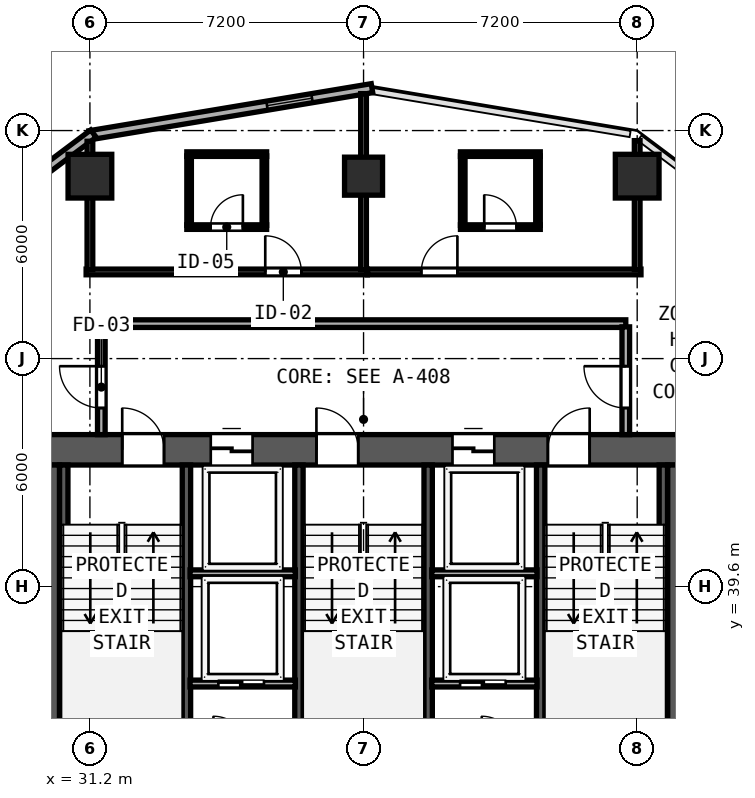
"""IFC4 building model, lengths in metres.
Left out: names, types, materials, properties, quantities, classifications, styles, units other than length and angle.
Written with IfcOpenShell. Run it as: python <this file> out.ifc"""

import sys

from ifc_helpers import new_model, si_unit, direction, frame, frame_2d, origin, origin_2d, place, context, subcontext, project, spatial, rectangle, hollow_rectangle, extrude, element, fill, save


model = new_model("IFC4")
c1 = context("Model", 3, precision=1e-05, world=origin(), true_north=direction((0.0, 1.0)))
c2 = subcontext(c1, "Body", "Model", "MODEL_VIEW")
j1 = project(units=[si_unit("LENGTHUNIT", "METRE"), si_unit("PLANEANGLEUNIT", "RADIAN")], contexts=[c1])
p1 = place(None, origin())
s1 = spatial("IfcSite", under=j1, at=p1, CompositionType="ELEMENT")
p2 = place(p1, origin())
s2 = spatial("IfcBuilding", under=s1, at=p2, CompositionType="ELEMENT")
p3 = place(p2, frame((0.0, 0.0, 47.6)))
s3 = spatial("IfcBuildingStorey", under=s2, at=p3, CompositionType="ELEMENT", Elevation=47.6)
p4 = place(p3, frame((29.6, 43.2, 0.0), z_axis=(0.0, 0.0, 1.0), x_axis=(1.0, 0.0, 0.0)))
e1 = element("IfcWall", 1, at=p4, inside=s3, PredefinedType="SHEAR", context=c2, shape_type="SweptSolid", body=[
    extrude(rectangle(XDim=17.6, YDim=0.8, at=frame_2d((8.8, 0.0))), origin(), (0.0, 0.0, 1.0), 3.6),
])
p5 = place(p4, frame((2.45, 0.0, 0.0)))
e2 = element("IfcOpeningElement", 2, at=p5, cuts=e1, PredefinedType="OPENING", context=c2, shape_type="SweptSolid", body=[
    extrude(rectangle(XDim=1.1, YDim=2.15, at=frame_2d((0.55, 1.075))), frame((0.0, 0.41, 0.0), z_axis=(0.0, -1.0, 0.0), x_axis=(1.0, 0.0, 0.0)), (0.0, 0.0, 1.0), 0.82),
])
p6 = place(p4, frame((7.56, 0.0, 0.0)))
e3 = element("IfcOpeningElement", 3, at=p6, cuts=e1, PredefinedType="OPENING", context=c2, shape_type="SweptSolid", body=[
    extrude(rectangle(XDim=1.1, YDim=2.15, at=frame_2d((0.55, 1.075))), frame((0.0, 0.41, 0.0), z_axis=(0.0, -1.0, 0.0), x_axis=(1.0, 0.0, 0.0)), (0.0, 0.0, 1.0), 0.82),
])
p7 = place(p4, frame((13.65, 0.0, 0.0)))
e4 = element("IfcOpeningElement", 4, at=p7, cuts=e1, PredefinedType="OPENING", context=c2, shape_type="SweptSolid", body=[
    extrude(rectangle(XDim=1.1, YDim=2.15, at=frame_2d((0.55, 1.075))), frame((0.0, 0.41, 0.0), z_axis=(0.0, -1.0, 0.0), x_axis=(1.0, 0.0, 0.0)), (0.0, 0.0, 1.0), 0.82),
])
p8 = place(p4, frame((4.78, 0.0, 0.0)))
e5 = element("IfcOpeningElement", 5, at=p8, cuts=e1, PredefinedType="OPENING", context=c2, shape_type="SweptSolid", body=[
    extrude(rectangle(XDim=1.1, YDim=2.2, at=frame_2d((0.55, 1.1))), frame((0.0, 0.41, 0.0), z_axis=(0.0, -1.0, 0.0), x_axis=(1.0, 0.0, 0.0)), (0.0, 0.0, 1.0), 0.82),
])
p9 = place(p4, frame((11.14, 0.0, 0.0)))
e6 = element("IfcOpeningElement", 6, at=p9, cuts=e1, PredefinedType="OPENING", context=c2, shape_type="SweptSolid", body=[
    extrude(rectangle(XDim=1.1, YDim=2.2, at=frame_2d((0.55, 1.1))), frame((0.0, 0.41, 0.0), z_axis=(0.0, -1.0, 0.0), x_axis=(1.0, 0.0, 0.0)), (0.0, 0.0, 1.0), 0.82),
])
for number, where, z_axis, x_axis in (
    (7, (30.0, 32.8, 0.0), (0.0, 0.0, 1.0), (0.0, 1.0, 0.0)),
    (8, (46.8, 32.8, 0.0), (0.0, 0.0, 1.0), (0.0, 1.0, 0.0)),
):
    element("IfcWall", number, at=place(p3, frame(where, z_axis=z_axis, x_axis=x_axis)), inside=s3, PredefinedType="SHEAR", context=c2, shape_type="SweptSolid", body=[
        extrude(rectangle(XDim=10.0, YDim=0.8, at=frame_2d((5.0, 0.0))), origin(), (0.0, 0.0, 1.0), 3.6),
    ])
for number, where, z_axis, x_axis in (
    (9, (30.512, 35.39, 0.0), (0.0, 0.0, 1.0), (0.0, 1.0, 0.0)),
    (10, (33.74, 35.39, 0.0), (0.0, 0.0, 1.0), (0.0, 1.0, 0.0)),
    (11, (36.7, 35.39, 0.0), (0.0, 0.0, 1.0), (0.0, 1.0, 0.0)),
    (12, (40.1, 35.39, 0.0), (0.0, 0.0, 1.0), (0.0, 1.0, 0.0)),
    (13, (43.06, 35.39, 0.0), (0.0, 0.0, 1.0), (0.0, 1.0, 0.0)),
    (14, (46.288, 35.39, 0.0), (0.0, 0.0, 1.0), (0.0, 1.0, 0.0)),
):
    element("IfcWall", number, at=place(p3, frame(where, z_axis=z_axis, x_axis=x_axis)), inside=s3, PredefinedType="SHEAR", context=c2, shape_type="SweptSolid", body=[
        extrude(rectangle(XDim=7.41, YDim=0.22, at=frame_2d((3.705, 0.0))), origin(), (0.0, 0.0, 1.0), 3.6),
    ])
for number, where, z_axis, x_axis in (
    (15, (31.2, 50.4, 0.0), (0.0, 0.0, 1.0), (1.0, 0.0, 0.0)),
    (16, (45.6, 50.4, 0.0), (0.0, 0.0, 1.0), (1.0, 0.0, 0.0)),
):
    element("IfcColumn", number, at=place(p3, frame(where, z_axis=z_axis, x_axis=x_axis)), inside=s3, PredefinedType="COLUMN", context=c2, shape_type="SweptSolid", body=[
        extrude(hollow_rectangle(XDim=1.15, YDim=1.15, WallThickness=0.042, at=origin_2d()), origin(), (0.0, 0.0, 1.0), 3.8),
    ])
p10 = place(p3, frame((38.4, 50.4, 0.0), z_axis=(0.0, 0.0, 1.0), x_axis=(1.0, 0.0, 0.0)))
e17 = element("IfcColumn", 17, at=p10, inside=s3, PredefinedType="COLUMN", context=c2, shape_type="SweptSolid", body=[
    extrude(hollow_rectangle(XDim=1.0, YDim=1.0, WallThickness=0.038, at=origin_2d()), origin(), (0.0, 0.0, 1.0), 3.8),
])
p11 = place(p3, frame((38.622, 52.715, 0.0), z_axis=(0.0, 0.0, 1.0), x_axis=(-0.98639129485, -0.164414760418, 0.0)))
e18 = element("IfcWall", 18, at=p11, inside=s3, PredefinedType="SOLIDWALL", context=c2, shape_type="SweptSolid", body=[
    extrude(rectangle(XDim=7.53, YDim=0.24, at=frame_2d((3.765, 0.0))), origin(), (0.0, 0.0, 1.0), 3.6),
])
p12 = place(p11, frame((1.6, 0.0, 0.85)))
e19 = element("IfcOpeningElement", 19, at=p12, cuts=e18, PredefinedType="OPENING", context=c2, shape_type="SweptSolid", body=[
    extrude(rectangle(XDim=1.2, YDim=1.85, at=frame_2d((0.6, 0.925))), frame((0.0, 0.13, 0.0), z_axis=(0.0, -1.0, 0.0), x_axis=(1.0, 0.0, 0.0)), (0.0, 0.0, 1.0), 0.26),
])
p13 = place(p3, frame((31.292, 51.519, 0.0), z_axis=(0.0, 0.0, 1.0), x_axis=(-0.8, -0.6, 0.0)))
e20 = element("IfcWall", 20, at=p13, inside=s3, PredefinedType="SOLIDWALL", context=c2, shape_type="SweptSolid", body=[
    extrude(rectangle(XDim=6.021, YDim=0.24, at=frame_2d((3.01, 0.0))), origin(), (0.0, 0.0, 1.0), 3.6),
])
p14 = place(p13, frame((1.6, 0.0, 0.85)))
e21 = element("IfcOpeningElement", 21, at=p14, cuts=e20, PredefinedType="OPENING", context=c2, shape_type="SweptSolid", body=[
    extrude(rectangle(XDim=1.2, YDim=1.85, at=frame_2d((0.6, 0.925))), frame((0.0, 0.13, 0.0), z_axis=(0.0, -1.0, 0.0), x_axis=(1.0, 0.0, 0.0)), (0.0, 0.0, 1.0), 0.26),
])
p15 = place(p3, frame((31.5, 46.52, 0.0), z_axis=(0.0, 0.0, 1.0), x_axis=(1.0, 0.0, 0.0)))
e22 = element("IfcWall", 22, at=p15, inside=s3, PredefinedType="SOLIDWALL", context=c2, shape_type="SweptSolid", body=[
    extrude(rectangle(XDim=13.8, YDim=0.2, at=frame_2d((6.9, 0.0))), origin(), (0.0, 0.0, 1.0), 3.6),
])
p16 = place(p3, frame((31.5, 43.6, 0.0), z_axis=(0.0, 0.0, 1.0), x_axis=(0.0, 1.0, 0.0)))
e23 = element("IfcWall", 23, at=p16, inside=s3, PredefinedType="SOLIDWALL", context=c2, shape_type="SweptSolid", body=[
    extrude(rectangle(XDim=2.835, YDim=0.2, at=frame_2d((1.417, 0.0))), origin(), (0.0, 0.0, 1.0), 3.6),
])
p17 = place(p16, frame((1.8, 0.0, 0.0), z_axis=(0.0, 0.0, 1.0), x_axis=(-1.0, 0.0, 0.0)))
e24 = element("IfcOpeningElement", 24, at=p17, cuts=e23, PredefinedType="OPENING", context=c2, shape_type="SweptSolid", body=[
    extrude(rectangle(XDim=1.1, YDim=2.15, at=frame_2d((0.55, 1.075))), frame((0.0, 0.11, 0.0), z_axis=(0.0, -1.0, 0.0), x_axis=(1.0, 0.0, 0.0)), (0.0, 0.0, 1.0), 0.22),
])
p18 = place(p3, frame((45.3, 43.6, 0.0), z_axis=(0.0, 0.0, 1.0), x_axis=(0.0, 1.0, 0.0)))
e25 = element("IfcWall", 25, at=p18, inside=s3, PredefinedType="SOLIDWALL", context=c2, shape_type="SweptSolid", body=[
    extrude(rectangle(XDim=2.835, YDim=0.2, at=frame_2d((1.417, 0.0))), origin(), (0.0, 0.0, 1.0), 3.6),
])
p19 = place(p18, frame((0.7, 0.0, 0.0)))
e26 = element("IfcOpeningElement", 26, at=p19, cuts=e25, PredefinedType="OPENING", context=c2, shape_type="SweptSolid", body=[
    extrude(rectangle(XDim=1.1, YDim=2.15, at=frame_2d((0.55, 1.075))), frame((0.0, 0.11, 0.0), z_axis=(0.0, -1.0, 0.0), x_axis=(1.0, 0.0, 0.0)), (0.0, 0.0, 1.0), 0.22),
])
for number, where, z_axis, x_axis in (
    (27, (33.835, 39.95, 0.0), (0.0, 0.0, 1.0), (1.0, 0.0, 0.0)),
    (28, (40.195, 39.95, 0.0), (0.0, 0.0, 1.0), (1.0, 0.0, 0.0)),
):
    element("IfcWall", number, at=place(p3, frame(where, z_axis=z_axis, x_axis=x_axis)), inside=s3, PredefinedType="SOLIDWALL", context=c2, shape_type="SweptSolid", body=[
        extrude(rectangle(XDim=2.77, YDim=0.18, at=frame_2d((1.385, 0.0))), origin(), (0.0, 0.0, 1.0), 3.6),
    ])
p20 = place(p3, frame((33.835, 37.05, 0.0), z_axis=(0.0, 0.0, 1.0), x_axis=(1.0, 0.0, 0.0)))
e29 = element("IfcWall", 29, at=p20, inside=s3, PredefinedType="SOLIDWALL", context=c2, shape_type="SweptSolid", body=[
    extrude(rectangle(XDim=2.77, YDim=0.18, at=frame_2d((1.385, 0.0))), origin(), (0.0, 0.0, 1.0), 3.6),
])
p21 = place(p20, frame((1.945, 0.0, 0.0), z_axis=(0.0, 0.0, 1.0), x_axis=(-1.0, 0.0, 0.0)))
e30 = element("IfcOpeningElement", 30, at=p21, cuts=e29, PredefinedType="OPENING", context=c2, shape_type="SweptSolid", body=[
    extrude(rectangle(XDim=1.2, YDim=2.2, at=frame_2d((0.6, 1.1))), frame((0.0, 0.1, 0.0), z_axis=(0.0, -1.0, 0.0), x_axis=(1.0, 0.0, 0.0)), (0.0, 0.0, 1.0), 0.2),
])
p22 = place(p3, frame((40.195, 37.05, 0.0), z_axis=(0.0, 0.0, 1.0), x_axis=(1.0, 0.0, 0.0)))
e31 = element("IfcWall", 31, at=p22, inside=s3, PredefinedType="SOLIDWALL", context=c2, shape_type="SweptSolid", body=[
    extrude(rectangle(XDim=2.77, YDim=0.18, at=frame_2d((1.385, 0.0))), origin(), (0.0, 0.0, 1.0), 3.6),
])
p23 = place(p22, frame((1.945, 0.0, 0.0), z_axis=(0.0, 0.0, 1.0), x_axis=(-1.0, 0.0, 0.0)))
e32 = element("IfcOpeningElement", 32, at=p23, cuts=e31, PredefinedType="OPENING", context=c2, shape_type="SweptSolid", body=[
    extrude(rectangle(XDim=1.2, YDim=2.2, at=frame_2d((0.6, 1.1))), frame((0.0, 0.1, 0.0), z_axis=(0.0, -1.0, 0.0), x_axis=(1.0, 0.0, 0.0)), (0.0, 0.0, 1.0), 0.2),
])
p24 = place(p3, frame((31.1, 47.88, 0.0), z_axis=(0.0, 0.0, 1.0), x_axis=(1.0, 0.0, 0.0)))
e33 = element("IfcWall", 33, at=p24, inside=s3, PredefinedType="PARTITIONING", context=c2, shape_type="SweptSolid", body=[
    extrude(rectangle(XDim=7.4, YDim=0.15, at=frame_2d((3.7, 0.0))), origin(), (0.0, 0.0, 1.0), 3.6),
])
p25 = place(p24, frame((4.714, 0.0, 0.0)))
e34 = element("IfcOpeningElement", 34, at=p25, cuts=e33, PredefinedType="OPENING", context=c2, shape_type="SweptSolid", body=[
    extrude(rectangle(XDim=0.95, YDim=2.15, at=frame_2d((0.475, 1.075))), frame((0.0, 0.085, 0.0), z_axis=(0.0, -1.0, 0.0), x_axis=(1.0, 0.0, 0.0)), (0.0, 0.0, 1.0), 0.17),
])
p26 = place(p3, frame((31.2, 47.94, 0.0), z_axis=(0.0, 0.0, 1.0), x_axis=(0.0, 1.0, 0.0)))
e35 = element("IfcWall", 35, at=p26, inside=s3, PredefinedType="PARTITIONING", context=c2, shape_type="SweptSolid", body=[
    extrude(rectangle(XDim=3.379, YDim=0.15, at=frame_2d((1.689, 0.0))), origin(), (0.0, 0.0, 1.0), 2.985),
])
p27 = place(p3, frame((38.4, 47.94, 0.0), z_axis=(0.0, 0.0, 1.0), x_axis=(0.0, 1.0, 0.0)))
e36 = element("IfcWall", 36, at=p27, inside=s3, PredefinedType="PARTITIONING", context=c2, shape_type="SweptSolid", body=[
    extrude(rectangle(XDim=4.632, YDim=0.15, at=frame_2d((2.316, 0.0))), origin(), (0.0, 0.0, 1.0), 3.6),
])
p28 = place(p3, frame((33.75, 50.98, 0.0), z_axis=(0.0, 0.0, 1.0), x_axis=(1.0, 0.0, 0.0)))
e37 = element("IfcWall", 37, at=p28, inside=s3, PredefinedType="PARTITIONING", context=c2, shape_type="SweptSolid", body=[
    extrude(rectangle(XDim=2.1, YDim=0.12, at=frame_2d((1.05, 0.0))), origin(), (0.0, 0.0, 1.0), 3.6),
])
p29 = place(p3, frame((33.75, 49.06, 0.0), z_axis=(0.0, 0.0, 1.0), x_axis=(1.0, 0.0, 0.0)))
e38 = element("IfcWall", 38, at=p29, inside=s3, PredefinedType="PARTITIONING", context=c2, shape_type="SweptSolid", body=[
    extrude(rectangle(XDim=2.1, YDim=0.12, at=frame_2d((1.05, 0.0))), origin(), (0.0, 0.0, 1.0), 3.6),
])
p30 = place(p29, frame((0.625, 0.0, 0.0)))
e39 = element("IfcOpeningElement", 39, at=p30, cuts=e38, PredefinedType="OPENING", context=c2, shape_type="SweptSolid", body=[
    extrude(rectangle(XDim=0.85, YDim=2.1, at=frame_2d((0.425, 1.05))), frame((0.0, 0.07, 0.0), z_axis=(0.0, -1.0, 0.0), x_axis=(1.0, 0.0, 0.0)), (0.0, 0.0, 1.0), 0.14),
])
for number, where, z_axis, x_axis in (
    (40, (33.81, 49.105, 0.0), (0.0, 0.0, 1.0), (0.0, 1.0, 0.0)),
    (41, (35.79, 49.105, 0.0), (0.0, 0.0, 1.0), (0.0, 1.0, 0.0)),
):
    element("IfcWall", number, at=place(p3, frame(where, z_axis=z_axis, x_axis=x_axis)), inside=s3, PredefinedType="PARTITIONING", context=c2, shape_type="SweptSolid", body=[
        extrude(rectangle(XDim=1.83, YDim=0.12, at=frame_2d((0.915, 0.0))), origin(), (0.0, 0.0, 1.0), 3.6),
    ])
p31 = place(p3, frame((38.502, 47.88, 0.0), z_axis=(0.0, 0.0, 1.0), x_axis=(1.0, 0.0, 0.0)))
e42 = element("IfcWall", 42, at=p31, inside=s3, PredefinedType="PARTITIONING", context=c2, shape_type="SweptSolid", body=[
    extrude(rectangle(XDim=7.198, YDim=0.15, at=frame_2d((3.599, 0.0))), origin(), (0.0, 0.0, 1.0), 3.6),
])
p32 = place(p31, frame((1.417, 0.0, 0.0)))
e43 = element("IfcOpeningElement", 43, at=p32, cuts=e42, PredefinedType="OPENING", context=c2, shape_type="SweptSolid", body=[
    extrude(rectangle(XDim=0.95, YDim=2.15, at=frame_2d((0.475, 1.075))), frame((0.0, 0.085, 0.0), z_axis=(0.0, -1.0, 0.0), x_axis=(1.0, 0.0, 0.0)), (0.0, 0.0, 1.0), 0.17),
])
p33 = place(p3, frame((45.6, 47.94, 0.0), z_axis=(0.0, 0.0, 1.0), x_axis=(0.0, 1.0, 0.0)))
e44 = element("IfcWall", 44, at=p33, inside=s3, PredefinedType="PARTITIONING", context=c2, shape_type="SweptSolid", body=[
    extrude(rectangle(XDim=3.395, YDim=0.15, at=frame_2d((1.698, 0.0))), origin(), (0.0, 0.0, 1.0), 2.985),
])
p34 = place(p3, frame((40.95, 50.98, 0.0), z_axis=(0.0, 0.0, 1.0), x_axis=(1.0, 0.0, 0.0)))
e45 = element("IfcWall", 45, at=p34, inside=s3, PredefinedType="PARTITIONING", context=c2, shape_type="SweptSolid", body=[
    extrude(rectangle(XDim=2.1, YDim=0.12, at=frame_2d((1.05, 0.0))), origin(), (0.0, 0.0, 1.0), 3.6),
])
p35 = place(p3, frame((40.95, 49.06, 0.0), z_axis=(0.0, 0.0, 1.0), x_axis=(1.0, 0.0, 0.0)))
e46 = element("IfcWall", 46, at=p35, inside=s3, PredefinedType="PARTITIONING", context=c2, shape_type="SweptSolid", body=[
    extrude(rectangle(XDim=2.1, YDim=0.12, at=frame_2d((1.05, 0.0))), origin(), (0.0, 0.0, 1.0), 3.6),
])
p36 = place(p35, frame((0.625, 0.0, 0.0)))
e47 = element("IfcOpeningElement", 47, at=p36, cuts=e46, PredefinedType="OPENING", context=c2, shape_type="SweptSolid", body=[
    extrude(rectangle(XDim=0.85, YDim=2.1, at=frame_2d((0.425, 1.05))), frame((0.0, 0.07, 0.0), z_axis=(0.0, -1.0, 0.0), x_axis=(1.0, 0.0, 0.0)), (0.0, 0.0, 1.0), 0.14),
])
for number, where, z_axis, x_axis in (
    (48, (41.01, 49.105, 0.0), (0.0, 0.0, 1.0), (0.0, 1.0, 0.0)),
    (49, (42.99, 49.105, 0.0), (0.0, 0.0, 1.0), (0.0, 1.0, 0.0)),
):
    element("IfcWall", number, at=place(p3, frame(where, z_axis=z_axis, x_axis=x_axis)), inside=s3, PredefinedType="PARTITIONING", context=c2, shape_type="SweptSolid", body=[
        extrude(rectangle(XDim=1.83, YDim=0.12, at=frame_2d((0.915, 0.0))), origin(), (0.0, 0.0, 1.0), 3.6),
    ])
p37 = place(p12, origin())
e50 = element("IfcWindow", 50, at=p37, inside=s3, PartitioningType="SINGLE_PANEL", PredefinedType="WINDOW", context=c2, shape_type="SweptSolid", body=[
    extrude(rectangle(XDim=1.2, YDim=1.85, at=frame_2d((0.6, 0.925))), frame((0.0, 0.03, 0.0), z_axis=(0.0, -1.0, 0.0), x_axis=(1.0, 0.0, 0.0)), (0.0, 0.0, 1.0), 0.06),
])
fill(e19, e50)
p38 = place(p5, origin())
e51 = element("IfcDoor", 51, at=p38, inside=s3, OperationType="SINGLE_SWING_LEFT", PredefinedType="DOOR", context=c2, shape_type="SweptSolid", body=[
    extrude(rectangle(XDim=1.1, YDim=2.15, at=frame_2d((0.55, 1.075))), frame((0.0, 0.185, 0.0), z_axis=(0.0, -1.0, 0.0), x_axis=(1.0, 0.0, 0.0)), (0.0, 0.0, 1.0), 0.05),
])
fill(e2, e51)
p39 = place(p6, origin())
e52 = element("IfcDoor", 52, at=p39, inside=s3, OperationType="SINGLE_SWING_LEFT", PredefinedType="DOOR", context=c2, shape_type="SweptSolid", body=[
    extrude(rectangle(XDim=1.1, YDim=2.15, at=frame_2d((0.55, 1.075))), frame((0.0, 0.185, 0.0), z_axis=(0.0, -1.0, 0.0), x_axis=(1.0, 0.0, 0.0)), (0.0, 0.0, 1.0), 0.05),
])
fill(e3, e52)
p40 = place(p7, origin())
e53 = element("IfcDoor", 53, at=p40, inside=s3, OperationType="SINGLE_SWING_RIGHT", PredefinedType="DOOR", context=c2, shape_type="SweptSolid", body=[
    extrude(rectangle(XDim=1.1, YDim=2.15, at=frame_2d((0.55, 1.075))), frame((0.0, 0.185, 0.0), z_axis=(0.0, -1.0, 0.0), x_axis=(1.0, 0.0, 0.0)), (0.0, 0.0, 1.0), 0.05),
])
fill(e4, e53)
p41 = place(p17, origin())
e54 = element("IfcDoor", 54, at=p41, inside=s3, OperationType="SINGLE_SWING_LEFT", PredefinedType="DOOR", context=c2, shape_type="SweptSolid", body=[
    extrude(rectangle(XDim=1.1, YDim=2.15, at=frame_2d((0.55, 1.075))), frame((0.0, 0.025, 0.0), z_axis=(0.0, -1.0, 0.0), x_axis=(1.0, 0.0, 0.0)), (0.0, 0.0, 1.0), 0.05),
])
fill(e24, e54)
p42 = place(p19, origin())
e55 = element("IfcDoor", 55, at=p42, inside=s3, OperationType="SINGLE_SWING_RIGHT", PredefinedType="DOOR", context=c2, shape_type="SweptSolid", body=[
    extrude(rectangle(XDim=1.1, YDim=2.15, at=frame_2d((0.55, 1.075))), frame((0.0, 0.025, 0.0), z_axis=(0.0, -1.0, 0.0), x_axis=(1.0, 0.0, 0.0)), (0.0, 0.0, 1.0), 0.05),
])
fill(e26, e55)
p43 = place(p8, origin())
e56 = element("IfcDoor", 56, at=p43, inside=s3, OperationType="SLIDING_TO_LEFT", PredefinedType="DOOR", context=c2, shape_type="SweptSolid", body=[
    extrude(rectangle(XDim=1.1, YDim=2.2, at=frame_2d((0.55, 1.1))), frame((0.0, 0.185, 0.0), z_axis=(0.0, -1.0, 0.0), x_axis=(1.0, 0.0, 0.0)), (0.0, 0.0, 1.0), 0.05),
])
fill(e5, e56)
p44 = place(p9, origin())
e57 = element("IfcDoor", 57, at=p44, inside=s3, OperationType="SLIDING_TO_LEFT", PredefinedType="DOOR", context=c2, shape_type="SweptSolid", body=[
    extrude(rectangle(XDim=1.1, YDim=2.2, at=frame_2d((0.55, 1.1))), frame((0.0, 0.185, 0.0), z_axis=(0.0, -1.0, 0.0), x_axis=(1.0, 0.0, 0.0)), (0.0, 0.0, 1.0), 0.05),
])
fill(e6, e57)
p45 = place(p21, origin())
e58 = element("IfcDoor", 58, at=p45, inside=s3, OperationType="SLIDING_TO_RIGHT", PredefinedType="DOOR", context=c2, shape_type="SweptSolid", body=[
    extrude(rectangle(XDim=1.2, YDim=2.2, at=frame_2d((0.6, 1.1))), frame((0.0, 0.025, 0.0), z_axis=(0.0, -1.0, 0.0), x_axis=(1.0, 0.0, 0.0)), (0.0, 0.0, 1.0), 0.05),
])
fill(e30, e58)
p46 = place(p23, origin())
e59 = element("IfcDoor", 59, at=p46, inside=s3, OperationType="SLIDING_TO_RIGHT", PredefinedType="DOOR", context=c2, shape_type="SweptSolid", body=[
    extrude(rectangle(XDim=1.2, YDim=2.2, at=frame_2d((0.6, 1.1))), frame((0.0, 0.025, 0.0), z_axis=(0.0, -1.0, 0.0), x_axis=(1.0, 0.0, 0.0)), (0.0, 0.0, 1.0), 0.05),
])
fill(e32, e59)
p47 = place(p25, origin())
e60 = element("IfcDoor", 60, at=p47, inside=s3, OperationType="SINGLE_SWING_LEFT", PredefinedType="DOOR", context=c2, shape_type="SweptSolid", body=[
    extrude(rectangle(XDim=0.95, YDim=2.15, at=frame_2d((0.475, 1.075))), frame((0.0, 0.025, 0.0), z_axis=(0.0, -1.0, 0.0), x_axis=(1.0, 0.0, 0.0)), (0.0, 0.0, 1.0), 0.05),
])
fill(e34, e60)
p48 = place(p30, origin())
e61 = element("IfcDoor", 61, at=p48, inside=s3, OperationType="SINGLE_SWING_RIGHT", PredefinedType="DOOR", context=c2, shape_type="SweptSolid", body=[
    extrude(rectangle(XDim=0.85, YDim=2.1, at=frame_2d((0.425, 1.05))), frame((0.0, 0.025, 0.0), z_axis=(0.0, -1.0, 0.0), x_axis=(1.0, 0.0, 0.0)), (0.0, 0.0, 1.0), 0.05),
])
fill(e39, e61)
p49 = place(p32, origin())
e62 = element("IfcDoor", 62, at=p49, inside=s3, OperationType="SINGLE_SWING_RIGHT", PredefinedType="DOOR", context=c2, shape_type="SweptSolid", body=[
    extrude(rectangle(XDim=0.95, YDim=2.15, at=frame_2d((0.475, 1.075))), frame((0.0, 0.025, 0.0), z_axis=(0.0, -1.0, 0.0), x_axis=(1.0, 0.0, 0.0)), (0.0, 0.0, 1.0), 0.05),
])
fill(e43, e62)
p50 = place(p36, origin())
e63 = element("IfcDoor", 63, at=p50, inside=s3, OperationType="SINGLE_SWING_LEFT", PredefinedType="DOOR", context=c2, shape_type="SweptSolid", body=[
    extrude(rectangle(XDim=0.85, YDim=2.1, at=frame_2d((0.425, 1.05))), frame((0.0, 0.025, 0.0), z_axis=(0.0, -1.0, 0.0), x_axis=(1.0, 0.0, 0.0)), (0.0, 0.0, 1.0), 0.05),
])
fill(e47, e63)
save(model, sys.argv[1])
